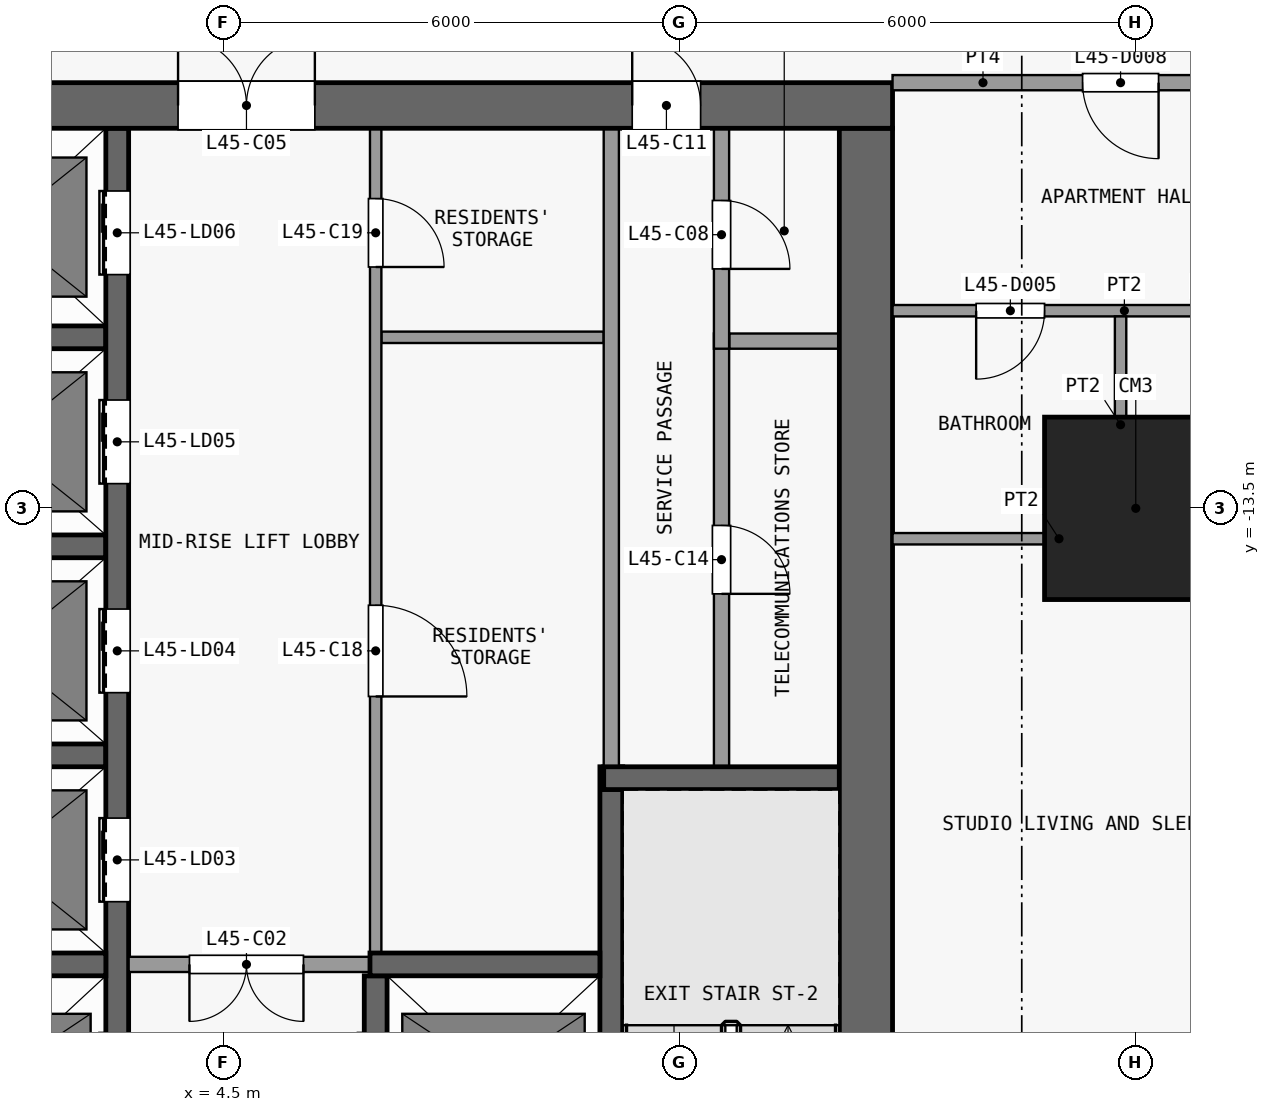
"""IFC4 building model, lengths in metres.
Left out: names, types, materials, properties, quantities, classifications, styles, units other than length and angle.
Written with IfcOpenShell. Run it as: python <this file> out.ifc"""

import sys

from ifc_helpers import new_model, si_unit, direction, frame, frame_2d, origin, origin_2d, place, context, subcontext, project, spatial, rectangle, extrude, element, fill, save


model = new_model("IFC4")
c1 = context("Model", 3, precision=1e-05, world=origin(), true_north=direction((0.0, 1.0)))
c2 = subcontext(c1, "Body", "Model", "MODEL_VIEW")
j1 = project(units=[si_unit("LENGTHUNIT", "METRE"), si_unit("PLANEANGLEUNIT", "RADIAN")], contexts=[c1])
p1 = place(None, origin())
s1 = spatial("IfcSite", under=j1, at=p1, CompositionType="ELEMENT")
p2 = place(p1, origin())
s2 = spatial("IfcBuilding", under=s1, at=p2, CompositionType="ELEMENT")
p3 = place(p2, frame((0.0, 0.0, 181.7)))
s3 = spatial("IfcBuildingStorey", under=s2, at=p3, CompositionType="ELEMENT", Elevation=181.7)
p4 = place(p3, frame((16.5, -13.5, 0.0), z_axis=(0.0, 0.0, 1.0), x_axis=(1.0, 0.0, 0.0)))
e1 = element("IfcColumn", 1, at=p4, inside=s3, PredefinedType="COLUMN", context=c2, shape_type="SweptSolid", body=[
    extrude(rectangle(XDim=2.4, YDim=2.4, at=origin_2d()), origin(), (0.0, 0.0, 1.0), 3.6),
])
p5 = place(p3, frame((-13.3, -8.2, 0.0), z_axis=(0.0, 0.0, 1.0), x_axis=(1.0, 0.0, 0.0)))
e2 = element("IfcWall", 2, at=p5, inside=s3, PredefinedType="SHEAR", context=c2, shape_type="SweptSolid", body=[
    extrude(rectangle(XDim=26.6, YDim=0.6, at=frame_2d((13.3, 0.0))), origin(), (0.0, 0.0, 1.0), 3.3),
])
p6 = place(p5, frame((7.6, 0.0, 0.0)))
e3 = element("IfcOpeningElement", 3, at=p6, cuts=e2, PredefinedType="OPENING", context=c2, shape_type="SweptSolid", body=[
    extrude(rectangle(XDim=1.8, YDim=2.1, at=frame_2d((0.9, 1.05))), frame((0.0, 0.31, 0.0), z_axis=(0.0, -1.0, 0.0), x_axis=(1.0, 0.0, 0.0)), (0.0, 0.0, 1.0), 0.62),
])
p7 = place(p5, frame((17.2, 0.0, 0.0)))
e4 = element("IfcOpeningElement", 4, at=p7, cuts=e2, PredefinedType="OPENING", context=c2, shape_type="SweptSolid", body=[
    extrude(rectangle(XDim=1.8, YDim=2.1, at=frame_2d((0.9, 1.05))), frame((0.0, 0.31, 0.0), z_axis=(0.0, -1.0, 0.0), x_axis=(1.0, 0.0, 0.0)), (0.0, 0.0, 1.0), 0.62),
])
p8 = place(p5, frame((2.525, 0.0, 0.0)))
e5 = element("IfcOpeningElement", 5, at=p8, cuts=e2, PredefinedType="OPENING", context=c2, shape_type="SweptSolid", body=[
    extrude(rectangle(XDim=0.9, YDim=2.1, at=frame_2d((0.45, 1.05))), frame((0.0, 0.31, 0.0), z_axis=(0.0, -1.0, 0.0), x_axis=(1.0, 0.0, 0.0)), (0.0, 0.0, 1.0), 0.62),
])
p9 = place(p5, frame((23.175, 0.0, 0.0)))
e6 = element("IfcOpeningElement", 6, at=p9, cuts=e2, PredefinedType="OPENING", context=c2, shape_type="SweptSolid", body=[
    extrude(rectangle(XDim=0.9, YDim=2.1, at=frame_2d((0.45, 1.05))), frame((0.0, 0.31, 0.0), z_axis=(0.0, -1.0, 0.0), x_axis=(1.0, 0.0, 0.0)), (0.0, 0.0, 1.0), 0.62),
])
p10 = place(p3, frame((12.95, -24.6, 0.0), z_axis=(0.0, 0.0, 1.0), x_axis=(0.0, 1.0, 0.0)))
e7 = element("IfcWall", 7, at=p10, inside=s3, PredefinedType="SHEAR", context=c2, shape_type="SweptSolid", body=[
    extrude(rectangle(XDim=16.1, YDim=0.7, at=frame_2d((8.05, 0.0))), origin(), (0.0, 0.0, 1.0), 3.3),
])
p11 = place(p3, frame((0.15, -19.5, 0.0), z_axis=(0.0, 0.0, 1.0), x_axis=(1.0, 0.0, 0.0)))
e8 = element("IfcWall", 8, at=p11, inside=s3, PredefinedType="SHEAR", context=c2, shape_type="SweptSolid", body=[
    extrude(rectangle(XDim=2.8, YDim=0.3, at=frame_2d((1.4, 0.0))), origin(), (0.0, 0.0, 1.0), 3.3),
])
p12 = place(p3, frame((6.575, -19.5, 0.0), z_axis=(0.0, 0.0, 1.0), x_axis=(-1.0, 0.0, 0.0)))
e9 = element("IfcWall", 9, at=p12, inside=s3, PredefinedType="PARTITIONING", context=c2, shape_type="SweptSolid", body=[
    extrude(rectangle(XDim=3.325, YDim=0.2, at=frame_2d((1.663, 0.0))), origin(), (0.0, 0.0, 1.0), 3.3),
])
p13 = place(p12, frame((1.025, 0.0, 0.0)))
e10 = element("IfcOpeningElement", 10, at=p13, cuts=e9, PredefinedType="OPENING", context=c2, shape_type="SweptSolid", body=[
    extrude(rectangle(XDim=1.5, YDim=2.1, at=frame_2d((0.75, 1.05))), frame((0.0, 0.11, 0.0), z_axis=(0.0, -1.0, 0.0), x_axis=(1.0, 0.0, 0.0)), (0.0, 0.0, 1.0), 0.22),
])
p14 = place(p3, frame((6.425, -19.5, 0.0), z_axis=(0.0, 0.0, 1.0), x_axis=(1.0, 0.0, 0.0)))
e11 = element("IfcWall", 11, at=p14, inside=s3, PredefinedType="SHEAR", context=c2, shape_type="SweptSolid", body=[
    extrude(rectangle(XDim=3.025, YDim=0.3, at=frame_2d((1.512, 0.0))), origin(), (0.0, 0.0, 1.0), 3.3),
])
p15 = place(p3, frame((9.5, -17.05, 0.0), z_axis=(0.0, 0.0, 1.0), x_axis=(1.0, 0.0, 0.0)))
e12 = element("IfcWall", 12, at=p15, inside=s3, PredefinedType="SHEAR", context=c2, shape_type="SweptSolid", body=[
    extrude(rectangle(XDim=3.1, YDim=0.3, at=frame_2d((1.55, 0.0))), origin(), (0.0, 0.0, 1.0), 3.3),
])
for number, where, z_axis, x_axis in (
    (13, (0.15, -16.75, 0.0), (0.0, 0.0, 1.0), (1.0, 0.0, 0.0)),
    (14, (0.15, -14.0, 0.0), (0.0, 0.0, 1.0), (1.0, 0.0, 0.0)),
):
    element("IfcWall", number, at=place(p3, frame(where, z_axis=z_axis, x_axis=x_axis)), inside=s3, PredefinedType="SHEAR", context=c2, shape_type="SweptSolid", body=[
        extrude(rectangle(XDim=2.8, YDim=0.3, at=frame_2d((1.4, 0.0))), origin(), (0.0, 0.0, 1.0), 3.3),
    ])
p16 = place(p3, frame((11.15, -11.3, 0.0), z_axis=(0.0, 0.0, 1.0), x_axis=(1.0, 0.0, 0.0)))
e15 = element("IfcWall", 15, at=p16, inside=s3, PredefinedType="PARTITIONING", context=c2, shape_type="SweptSolid", body=[
    extrude(rectangle(XDim=1.45, YDim=0.2, at=frame_2d((0.725, 0.0))), origin(), (0.0, 0.0, 1.0), 3.3),
])
p17 = place(p3, frame((0.15, -11.25, 0.0), z_axis=(0.0, 0.0, 1.0), x_axis=(1.0, 0.0, 0.0)))
e16 = element("IfcWall", 16, at=p17, inside=s3, PredefinedType="SHEAR", context=c2, shape_type="SweptSolid", body=[
    extrude(rectangle(XDim=2.8, YDim=0.3, at=frame_2d((1.4, 0.0))), origin(), (0.0, 0.0, 1.0), 3.3),
])
p18 = place(p3, frame((6.575, -11.25, 0.0), z_axis=(0.0, 0.0, 1.0), x_axis=(1.0, 0.0, 0.0)))
e17 = element("IfcWall", 17, at=p18, inside=s3, PredefinedType="PARTITIONING", context=c2, shape_type="SweptSolid", body=[
    extrude(rectangle(XDim=2.925, YDim=0.15, at=frame_2d((1.462, 0.0))), origin(), (0.0, 0.0, 1.0), 3.3),
])
p19 = place(p3, frame((3.1, -22.55, 0.0), z_axis=(0.0, 0.0, 1.0), x_axis=(0.0, 1.0, 0.0)))
e18 = element("IfcWall", 18, at=p19, inside=s3, PredefinedType="SHEAR", context=c2, shape_type="SweptSolid", body=[
    extrude(rectangle(XDim=14.05, YDim=0.3, at=frame_2d((7.025, 0.0))), origin(), (0.0, 0.0, 1.0), 3.3),
])
p20 = place(p19, frame((1.05, 0.0, 0.0)))
e19 = element("IfcOpeningElement", 19, at=p20, cuts=e18, PredefinedType="OPENING", context=c2, shape_type="SweptSolid", body=[
    extrude(rectangle(XDim=1.1, YDim=2.1, at=frame_2d((0.55, 1.05))), frame((0.0, 0.16, 0.0), z_axis=(0.0, -1.0, 0.0), x_axis=(1.0, 0.0, 0.0)), (0.0, 0.0, 1.0), 0.32),
])
p21 = place(p19, frame((3.875, 0.0, 0.0)))
e20 = element("IfcOpeningElement", 20, at=p21, cuts=e18, PredefinedType="OPENING", context=c2, shape_type="SweptSolid", body=[
    extrude(rectangle(XDim=1.1, YDim=2.1, at=frame_2d((0.55, 1.05))), frame((0.0, 0.16, 0.0), z_axis=(0.0, -1.0, 0.0), x_axis=(1.0, 0.0, 0.0)), (0.0, 0.0, 1.0), 0.32),
])
p22 = place(p19, frame((6.625, 0.0, 0.0)))
e21 = element("IfcOpeningElement", 21, at=p22, cuts=e18, PredefinedType="OPENING", context=c2, shape_type="SweptSolid", body=[
    extrude(rectangle(XDim=1.1, YDim=2.1, at=frame_2d((0.55, 1.05))), frame((0.0, 0.16, 0.0), z_axis=(0.0, -1.0, 0.0), x_axis=(1.0, 0.0, 0.0)), (0.0, 0.0, 1.0), 0.32),
])
p23 = place(p19, frame((9.375, 0.0, 0.0)))
e22 = element("IfcOpeningElement", 22, at=p23, cuts=e18, PredefinedType="OPENING", context=c2, shape_type="SweptSolid", body=[
    extrude(rectangle(XDim=1.1, YDim=2.1, at=frame_2d((0.55, 1.05))), frame((0.0, 0.16, 0.0), z_axis=(0.0, -1.0, 0.0), x_axis=(1.0, 0.0, 0.0)), (0.0, 0.0, 1.0), 0.32),
])
p24 = place(p19, frame((12.125, 0.0, 0.0)))
e23 = element("IfcOpeningElement", 23, at=p24, cuts=e18, PredefinedType="OPENING", context=c2, shape_type="SweptSolid", body=[
    extrude(rectangle(XDim=1.1, YDim=2.1, at=frame_2d((0.55, 1.05))), frame((0.0, 0.16, 0.0), z_axis=(0.0, -1.0, 0.0), x_axis=(1.0, 0.0, 0.0)), (0.0, 0.0, 1.0), 0.32),
])
p25 = place(p3, frame((6.5, -22.25, 0.0), z_axis=(0.0, 0.0, 1.0), x_axis=(0.0, 1.0, 0.0)))
e24 = element("IfcWall", 24, at=p25, inside=s3, PredefinedType="SHEAR", context=c2, shape_type="SweptSolid", body=[
    extrude(rectangle(XDim=2.6, YDim=0.3, at=frame_2d((1.3, 0.0))), origin(), (0.0, 0.0, 1.0), 3.3),
])
p26 = place(p25, frame((0.75, 0.0, 0.0)))
e25 = element("IfcOpeningElement", 25, at=p26, cuts=e24, PredefinedType="OPENING", context=c2, shape_type="SweptSolid", body=[
    extrude(rectangle(XDim=1.1, YDim=2.1, at=frame_2d((0.55, 1.05))), frame((0.0, 0.16, 0.0), z_axis=(0.0, -1.0, 0.0), x_axis=(1.0, 0.0, 0.0)), (0.0, 0.0, 1.0), 0.32),
])
p27 = place(p3, frame((6.5, -8.5, 0.0), z_axis=(0.0, 0.0, 1.0), x_axis=(0.0, -1.0, 0.0)))
e26 = element("IfcWall", 26, at=p27, inside=s3, PredefinedType="PARTITIONING", context=c2, shape_type="SweptSolid", body=[
    extrude(rectangle(XDim=10.85, YDim=0.15, at=frame_2d((5.425, 0.0))), origin(), (0.0, 0.0, 1.0), 3.3),
])
p28 = place(p27, frame((6.275, 0.0, 0.0)))
e27 = element("IfcOpeningElement", 27, at=p28, cuts=e26, PredefinedType="OPENING", context=c2, shape_type="SweptSolid", body=[
    extrude(rectangle(XDim=1.2, YDim=2.1, at=frame_2d((0.6, 1.05))), frame((0.0, 0.085, 0.0), z_axis=(0.0, -1.0, 0.0), x_axis=(1.0, 0.0, 0.0)), (0.0, 0.0, 1.0), 0.17),
])
p29 = place(p27, frame((0.925, 0.0, 0.0)))
e28 = element("IfcOpeningElement", 28, at=p29, cuts=e26, PredefinedType="OPENING", context=c2, shape_type="SweptSolid", body=[
    extrude(rectangle(XDim=0.9, YDim=2.1, at=frame_2d((0.45, 1.05))), frame((0.0, 0.085, 0.0), z_axis=(0.0, -1.0, 0.0), x_axis=(1.0, 0.0, 0.0)), (0.0, 0.0, 1.0), 0.17),
])
p30 = place(p3, frame((9.6, -16.9, 0.0), z_axis=(0.0, 0.0, 1.0), x_axis=(0.0, -1.0, 0.0)))
e29 = element("IfcWall", 29, at=p30, inside=s3, PredefinedType="SHEAR", context=c2, shape_type="SweptSolid", body=[
    extrude(rectangle(XDim=7.7, YDim=0.3, at=frame_2d((3.85, 0.0))), origin(), (0.0, 0.0, 1.0), 3.3),
])
p31 = place(p30, frame((6.5, 0.0, 0.0)))
e30 = element("IfcOpeningElement", 30, at=p31, cuts=e29, PredefinedType="OPENING", context=c2, shape_type="SweptSolid", body=[
    extrude(rectangle(XDim=1.1, YDim=2.1, at=frame_2d((0.55, 1.05))), frame((0.0, 0.16, 0.0), z_axis=(0.0, -1.0, 0.0), x_axis=(1.0, 0.0, 0.0)), (0.0, 0.0, 1.0), 0.32),
])
p32 = place(p3, frame((9.6, -16.9, 0.0), z_axis=(0.0, 0.0, 1.0), x_axis=(0.0, 1.0, 0.0)))
e31 = element("IfcWall", 31, at=p32, inside=s3, PredefinedType="PARTITIONING", context=c2, shape_type="SweptSolid", body=[
    extrude(rectangle(XDim=8.4, YDim=0.2, at=frame_2d((4.2, 0.0))), origin(), (0.0, 0.0, 1.0), 3.3),
])
p33 = place(p3, frame((11.05, -11.2, 0.0), z_axis=(0.0, 0.0, 1.0), x_axis=(0.0, -1.0, 0.0)))
e32 = element("IfcWall", 32, at=p33, inside=s3, PredefinedType="PARTITIONING", context=c2, shape_type="SweptSolid", body=[
    extrude(rectangle(XDim=5.7, YDim=0.2, at=frame_2d((2.85, 0.0))), origin(), (0.0, 0.0, 1.0), 3.3),
])
p34 = place(p33, frame((2.525, 0.0, 0.0)))
e33 = element("IfcOpeningElement", 33, at=p34, cuts=e32, PredefinedType="OPENING", context=c2, shape_type="SweptSolid", body=[
    extrude(rectangle(XDim=0.9, YDim=2.1, at=frame_2d((0.45, 1.05))), frame((0.0, 0.11, 0.0), z_axis=(0.0, -1.0, 0.0), x_axis=(1.0, 0.0, 0.0)), (0.0, 0.0, 1.0), 0.22),
])
p35 = place(p3, frame((11.05, -8.5, 0.0), z_axis=(0.0, 0.0, 1.0), x_axis=(0.0, -1.0, 0.0)))
e34 = element("IfcWall", 34, at=p35, inside=s3, PredefinedType="PARTITIONING", context=c2, shape_type="SweptSolid", body=[
    extrude(rectangle(XDim=2.9, YDim=0.2, at=frame_2d((1.45, 0.0))), origin(), (0.0, 0.0, 1.0), 3.3),
])
p36 = place(p35, frame((0.95, 0.0, 0.0)))
e35 = element("IfcOpeningElement", 35, at=p36, cuts=e34, PredefinedType="OPENING", context=c2, shape_type="SweptSolid", body=[
    extrude(rectangle(XDim=0.9, YDim=2.1, at=frame_2d((0.45, 1.05))), frame((0.0, 0.11, 0.0), z_axis=(0.0, -1.0, 0.0), x_axis=(1.0, 0.0, 0.0)), (0.0, 0.0, 1.0), 0.22),
])
p37 = place(p3, frame((13.3, -13.9, 0.0), z_axis=(0.0, 0.0, 1.0), x_axis=(1.0, 0.0, 0.0)))
e36 = element("IfcWall", 36, at=p37, inside=s3, PredefinedType="PARTITIONING", context=c2, shape_type="SweptSolid", body=[
    extrude(rectangle(XDim=5.962, YDim=0.15, at=frame_2d((2.981, 0.0))), origin(), (0.0, 0.0, 1.0), 3.3),
])
p38 = place(p37, frame((4.5, 0.0, 0.0)))
e37 = element("IfcOpeningElement", 37, at=p38, cuts=e36, PredefinedType="OPENING", context=c2, shape_type="SweptSolid", body=[
    extrude(rectangle(XDim=0.9, YDim=2.1, at=frame_2d((0.45, 1.05))), frame((0.0, 0.085, 0.0), z_axis=(0.0, -1.0, 0.0), x_axis=(1.0, 0.0, 0.0)), (0.0, 0.0, 1.0), 0.17),
])
p39 = place(p3, frame((13.3, -10.9, 0.0), z_axis=(0.0, 0.0, 1.0), x_axis=(1.0, 0.0, 0.0)))
e38 = element("IfcWall", 38, at=p39, inside=s3, PredefinedType="PARTITIONING", context=c2, shape_type="SweptSolid", body=[
    extrude(rectangle(XDim=5.962, YDim=0.15, at=frame_2d((2.981, 0.0))), origin(), (0.0, 0.0, 1.0), 3.3),
])
p40 = place(p39, frame((1.1, 0.0, 0.0)))
e39 = element("IfcOpeningElement", 39, at=p40, cuts=e38, PredefinedType="OPENING", context=c2, shape_type="SweptSolid", body=[
    extrude(rectangle(XDim=0.9, YDim=2.1, at=frame_2d((0.45, 1.05))), frame((0.0, 0.085, 0.0), z_axis=(0.0, -1.0, 0.0), x_axis=(1.0, 0.0, 0.0)), (0.0, 0.0, 1.0), 0.17),
])
p41 = place(p39, frame((4.1, 0.0, 0.0)))
e40 = element("IfcOpeningElement", 40, at=p41, cuts=e38, PredefinedType="OPENING", context=c2, shape_type="SweptSolid", body=[
    extrude(rectangle(XDim=0.9, YDim=2.1, at=frame_2d((0.45, 1.05))), frame((0.0, 0.085, 0.0), z_axis=(0.0, -1.0, 0.0), x_axis=(1.0, 0.0, 0.0)), (0.0, 0.0, 1.0), 0.17),
])
p42 = place(p3, frame((13.3, -7.9, 0.0), z_axis=(0.0, 0.0, 1.0), x_axis=(1.0, 0.0, 0.0)))
e41 = element("IfcWall", 41, at=p42, inside=s3, PredefinedType="PARTITIONING", context=c2, shape_type="SweptSolid", body=[
    extrude(rectangle(XDim=5.962, YDim=0.2, at=frame_2d((2.981, 0.0))), origin(), (0.0, 0.0, 1.0), 3.3),
])
p43 = place(p42, frame((2.5, 0.0, 0.0)))
e42 = element("IfcOpeningElement", 42, at=p43, cuts=e41, PredefinedType="OPENING", context=c2, shape_type="SweptSolid", body=[
    extrude(rectangle(XDim=1.0, YDim=2.1, at=frame_2d((0.5, 1.05))), frame((0.0, 0.11, 0.0), z_axis=(0.0, -1.0, 0.0), x_axis=(1.0, 0.0, 0.0)), (0.0, 0.0, 1.0), 0.22),
])
p44 = place(p3, frame((16.3, -13.825, 0.0), z_axis=(0.0, 0.0, 1.0), x_axis=(0.0, 1.0, 0.0)))
e43 = element("IfcWall", 43, at=p44, inside=s3, PredefinedType="PARTITIONING", context=c2, shape_type="SweptSolid", body=[
    extrude(rectangle(XDim=2.85, YDim=0.15, at=frame_2d((1.425, 0.0))), origin(), (0.0, 0.0, 1.0), 3.3),
])
p45 = place(p21, origin())
e44 = element("IfcDoor", 44, at=p45, inside=s3, OperationType="DOUBLE_DOOR_SLIDING", PredefinedType="DOOR", context=c2, shape_type="SweptSolid", body=[
    extrude(rectangle(XDim=1.1, YDim=2.1, at=frame_2d((0.55, 1.05))), frame((0.0, 0.025, 0.0), z_axis=(0.0, -1.0, 0.0), x_axis=(1.0, 0.0, 0.0)), (0.0, 0.0, 1.0), 0.05),
])
fill(e20, e44)
p46 = place(p22, origin())
e45 = element("IfcDoor", 45, at=p46, inside=s3, OperationType="DOUBLE_DOOR_SLIDING", PredefinedType="DOOR", context=c2, shape_type="SweptSolid", body=[
    extrude(rectangle(XDim=1.1, YDim=2.1, at=frame_2d((0.55, 1.05))), frame((0.0, 0.025, 0.0), z_axis=(0.0, -1.0, 0.0), x_axis=(1.0, 0.0, 0.0)), (0.0, 0.0, 1.0), 0.05),
])
fill(e21, e45)
p47 = place(p23, origin())
e46 = element("IfcDoor", 46, at=p47, inside=s3, OperationType="DOUBLE_DOOR_SLIDING", PredefinedType="DOOR", context=c2, shape_type="SweptSolid", body=[
    extrude(rectangle(XDim=1.1, YDim=2.1, at=frame_2d((0.55, 1.05))), frame((0.0, 0.025, 0.0), z_axis=(0.0, -1.0, 0.0), x_axis=(1.0, 0.0, 0.0)), (0.0, 0.0, 1.0), 0.05),
])
fill(e22, e46)
p48 = place(p24, origin())
e47 = element("IfcDoor", 47, at=p48, inside=s3, OperationType="DOUBLE_DOOR_SLIDING", PredefinedType="DOOR", context=c2, shape_type="SweptSolid", body=[
    extrude(rectangle(XDim=1.1, YDim=2.1, at=frame_2d((0.55, 1.05))), frame((0.0, 0.025, 0.0), z_axis=(0.0, -1.0, 0.0), x_axis=(1.0, 0.0, 0.0)), (0.0, 0.0, 1.0), 0.05),
])
fill(e23, e47)
p49 = place(p13, origin())
e48 = element("IfcDoor", 48, at=p49, inside=s3, OperationType="DOUBLE_DOOR_SINGLE_SWING", PredefinedType="DOOR", context=c2, shape_type="SweptSolid", body=[
    extrude(rectangle(XDim=1.5, YDim=2.1, at=frame_2d((0.75, 1.05))), frame((0.0, 0.025, 0.0), z_axis=(0.0, -1.0, 0.0), x_axis=(1.0, 0.0, 0.0)), (0.0, 0.0, 1.0), 0.05),
])
fill(e10, e48)
p50 = place(p7, origin())
e49 = element("IfcDoor", 49, at=p50, inside=s3, OperationType="DOUBLE_DOOR_SINGLE_SWING", PredefinedType="DOOR", context=c2, shape_type="SweptSolid", body=[
    extrude(rectangle(XDim=1.8, YDim=2.1, at=frame_2d((0.9, 1.05))), frame((0.0, 0.025, 0.0), z_axis=(0.0, -1.0, 0.0), x_axis=(1.0, 0.0, 0.0)), (0.0, 0.0, 1.0), 0.05),
])
fill(e4, e49)
p51 = place(p36, origin())
e50 = element("IfcDoor", 50, at=p51, inside=s3, OperationType="SINGLE_SWING_RIGHT", PredefinedType="DOOR", context=c2, shape_type="SweptSolid", body=[
    extrude(rectangle(XDim=0.9, YDim=2.1, at=frame_2d((0.45, 1.05))), frame((0.0, 0.025, 0.0), z_axis=(0.0, -1.0, 0.0), x_axis=(1.0, 0.0, 0.0)), (0.0, 0.0, 1.0), 0.05),
])
fill(e35, e50)
p52 = place(p9, origin())
e51 = element("IfcDoor", 51, at=p52, inside=s3, OperationType="SINGLE_SWING_LEFT", PredefinedType="DOOR", context=c2, shape_type="SweptSolid", body=[
    extrude(rectangle(XDim=0.9, YDim=2.1, at=frame_2d((0.45, 1.05))), frame((0.0, 0.025, 0.0), z_axis=(0.0, -1.0, 0.0), x_axis=(1.0, 0.0, 0.0)), (0.0, 0.0, 1.0), 0.05),
])
fill(e6, e51)
p53 = place(p34, origin())
e52 = element("IfcDoor", 52, at=p53, inside=s3, OperationType="SINGLE_SWING_RIGHT", PredefinedType="DOOR", context=c2, shape_type="SweptSolid", body=[
    extrude(rectangle(XDim=0.9, YDim=2.1, at=frame_2d((0.45, 1.05))), frame((0.0, 0.025, 0.0), z_axis=(0.0, -1.0, 0.0), x_axis=(1.0, 0.0, 0.0)), (0.0, 0.0, 1.0), 0.05),
])
fill(e33, e52)
p54 = place(p28, origin())
e53 = element("IfcDoor", 53, at=p54, inside=s3, OperationType="SINGLE_SWING_RIGHT", PredefinedType="DOOR", context=c2, shape_type="SweptSolid", body=[
    extrude(rectangle(XDim=1.2, YDim=2.1, at=frame_2d((0.6, 1.05))), frame((0.0, 0.025, 0.0), z_axis=(0.0, -1.0, 0.0), x_axis=(1.0, 0.0, 0.0)), (0.0, 0.0, 1.0), 0.05),
])
fill(e27, e53)
p55 = place(p29, origin())
e54 = element("IfcDoor", 54, at=p55, inside=s3, OperationType="SINGLE_SWING_RIGHT", PredefinedType="DOOR", context=c2, shape_type="SweptSolid", body=[
    extrude(rectangle(XDim=0.9, YDim=2.1, at=frame_2d((0.45, 1.05))), frame((0.0, 0.025, 0.0), z_axis=(0.0, -1.0, 0.0), x_axis=(1.0, 0.0, 0.0)), (0.0, 0.0, 1.0), 0.05),
])
fill(e28, e54)
p56 = place(p40, origin())
e55 = element("IfcDoor", 55, at=p56, inside=s3, OperationType="SINGLE_SWING_LEFT", PredefinedType="DOOR", context=c2, shape_type="SweptSolid", body=[
    extrude(rectangle(XDim=0.9, YDim=2.1, at=frame_2d((0.45, 1.05))), frame((0.0, 0.025, 0.0), z_axis=(0.0, -1.0, 0.0), x_axis=(1.0, 0.0, 0.0)), (0.0, 0.0, 1.0), 0.05),
])
fill(e39, e55)
p57 = place(p43, origin())
e56 = element("IfcDoor", 56, at=p57, inside=s3, OperationType="SINGLE_SWING_RIGHT", PredefinedType="DOOR", context=c2, shape_type="SweptSolid", body=[
    extrude(rectangle(XDim=1.0, YDim=2.1, at=frame_2d((0.5, 1.05))), frame((0.0, 0.025, 0.0), z_axis=(0.0, -1.0, 0.0), x_axis=(1.0, 0.0, 0.0)), (0.0, 0.0, 1.0), 0.05),
])
fill(e42, e56)
save(model, sys.argv[1])
